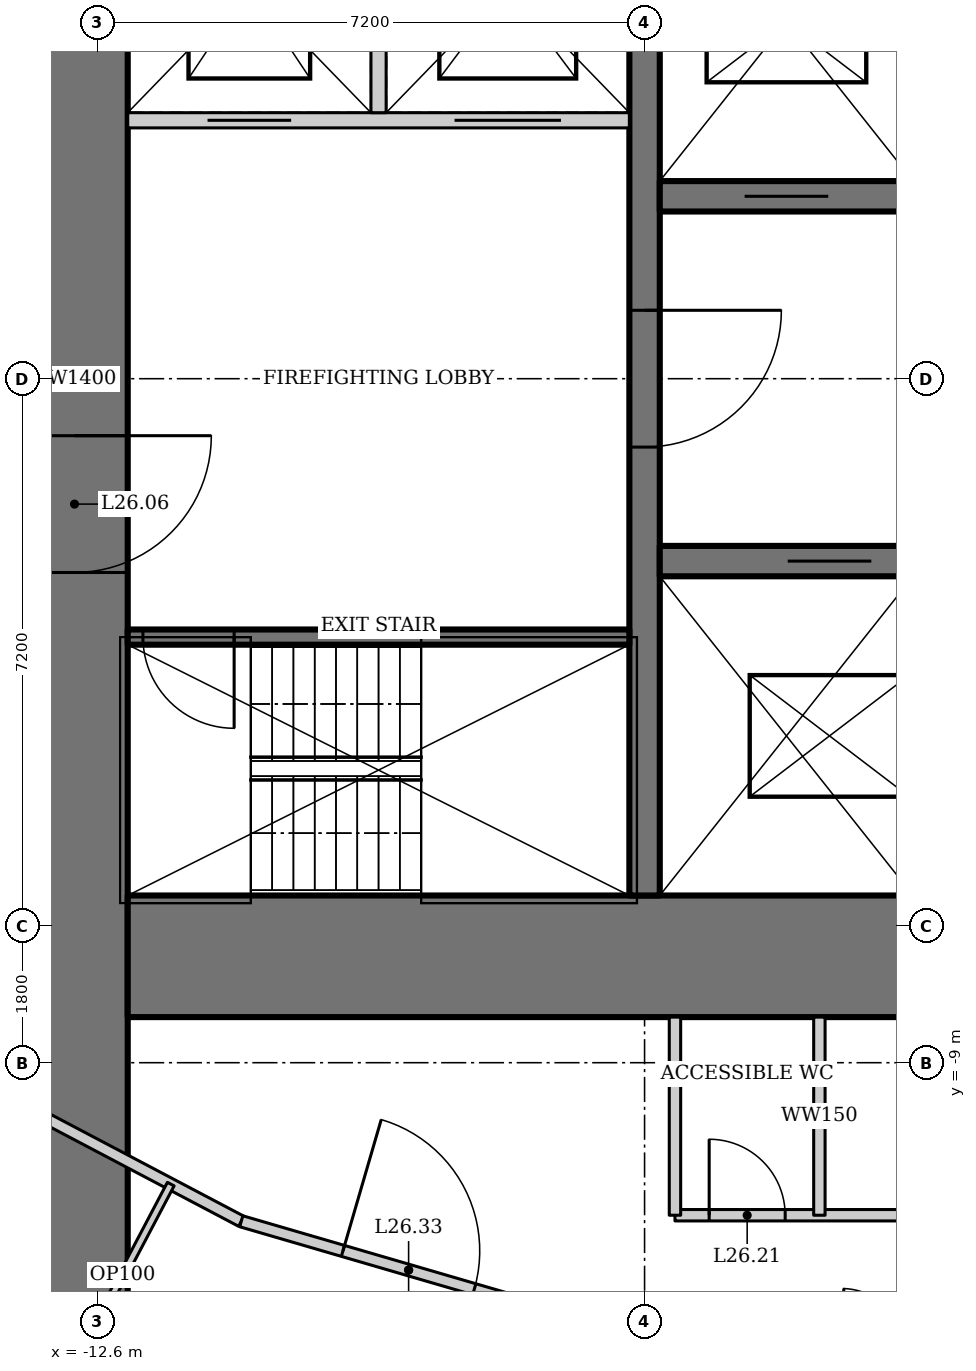
"""IFC4 building model, lengths in metres.
Left out: names, types, materials, properties, quantities, classifications, styles, units other than length and angle.
Written with IfcOpenShell. Run it as: python <this file> out.ifc"""

import sys

from ifc_helpers import new_model, si_unit, direction, frame, frame_2d, origin, place, context, subcontext, project, spatial, rectangle, extrude, element, fill, save


model = new_model("IFC4")
c1 = context("Model", 3, precision=1e-05, world=origin(), true_north=direction((0.0, 1.0)))
c2 = subcontext(c1, "Body", "Model", "MODEL_VIEW")
j1 = project(units=[si_unit("LENGTHUNIT", "METRE"), si_unit("PLANEANGLEUNIT", "RADIAN")], contexts=[c1])
p1 = place(None, origin())
s1 = spatial("IfcSite", under=j1, at=p1, CompositionType="ELEMENT")
p2 = place(p1, origin())
s2 = spatial("IfcBuilding", under=s1, at=p2, CompositionType="ELEMENT")
p3 = place(p2, frame((0.0, 0.0, 111.4)))
s3 = spatial("IfcBuildingStorey", under=s2, at=p3, CompositionType="ELEMENT", Elevation=111.4)
p4 = place(p3, frame((-12.9, 13.0, 0.0), z_axis=(0.0, 0.0, 1.0), x_axis=(0.0, -1.0, 0.0)))
e1 = element("IfcWall", 1, at=p4, inside=s3, PredefinedType="SHEAR", context=c2, shape_type="SweptSolid", body=[
    extrude(rectangle(XDim=26.0, YDim=1.4, at=frame_2d((13.0, 0.0))), origin(), (0.0, 0.0, 1.0), 6.0),
])
p5 = place(p4, frame((13.75, 0.0, 0.0)))
e2 = element("IfcOpeningElement", 2, at=p5, cuts=e1, PredefinedType="OPENING", context=c2, shape_type="SweptSolid", body=[
    extrude(rectangle(XDim=1.8, YDim=2.1, at=frame_2d((0.9, 1.05))), frame((0.0, 0.71, 0.0), z_axis=(0.0, -1.0, 0.0), x_axis=(1.0, 0.0, 0.0)), (0.0, 0.0, 1.0), 1.42),
])
p6 = place(p3, frame((-12.2, -7.6, 0.0), z_axis=(0.0, 0.0, 1.0), x_axis=(1.0, 0.0, 0.0)))
e3 = element("IfcWall", 3, at=p6, inside=s3, PredefinedType="SHEAR", context=c2, shape_type="SweptSolid", body=[
    extrude(rectangle(XDim=24.4, YDim=1.6, at=frame_2d((12.2, 0.0))), origin(), (0.0, 0.0, 1.0), 6.0),
])
p7 = place(p3, frame((-5.4, 6.8, 0.0), z_axis=(0.0, 0.0, 1.0), x_axis=(0.0, -1.0, 0.0)))
e4 = element("IfcWall", 4, at=p7, inside=s3, PredefinedType="SHEAR", context=c2, shape_type="SweptSolid", body=[
    extrude(rectangle(XDim=13.6, YDim=0.4, at=frame_2d((6.8, 0.0))), origin(), (0.0, 0.0, 1.0), 6.0),
])
p8 = place(p7, frame((5.9, 0.0, 0.0)))
e5 = element("IfcOpeningElement", 5, at=p8, cuts=e4, PredefinedType="OPENING", context=c2, shape_type="SweptSolid", body=[
    extrude(rectangle(XDim=1.8, YDim=2.1, at=frame_2d((0.9, 1.05))), frame((0.0, 0.21, 0.0), z_axis=(0.0, -1.0, 0.0), x_axis=(1.0, 0.0, 0.0)), (0.0, 0.0, 1.0), 0.42),
])
p9 = place(p3, frame((-5.2, -2.4, 0.0), z_axis=(0.0, 0.0, 1.0), x_axis=(1.0, 0.0, 0.0)))
e6 = element("IfcWall", 6, at=p9, inside=s3, PredefinedType="SHEAR", context=c2, shape_type="SweptSolid", body=[
    extrude(rectangle(XDim=10.4, YDim=0.4, at=frame_2d((5.2, 0.0))), origin(), (0.0, 0.0, 1.0), 6.0),
])
p10 = place(p9, frame((1.683, 0.0, 0.0)))
e7 = element("IfcOpeningElement", 7, at=p10, cuts=e6, PredefinedType="OPENING", context=c2, shape_type="SweptSolid", body=[
    extrude(rectangle(XDim=1.1, YDim=2.2, at=frame_2d((0.55, 1.1))), frame((0.0, 0.21, 0.0), z_axis=(0.0, -1.0, 0.0), x_axis=(1.0, 0.0, 0.0)), (0.0, 0.0, 1.0), 0.42),
])
p11 = place(p9, frame((5.217, 0.0, 0.0)))
e8 = element("IfcOpeningElement", 8, at=p11, cuts=e6, PredefinedType="OPENING", context=c2, shape_type="SweptSolid", body=[
    extrude(rectangle(XDim=1.1, YDim=2.2, at=frame_2d((0.55, 1.1))), frame((0.0, 0.21, 0.0), z_axis=(0.0, -1.0, 0.0), x_axis=(1.0, 0.0, 0.0)), (0.0, 0.0, 1.0), 0.42),
])
p12 = place(p9, frame((8.75, 0.0, 0.0)))
e9 = element("IfcOpeningElement", 9, at=p12, cuts=e6, PredefinedType="OPENING", context=c2, shape_type="SweptSolid", body=[
    extrude(rectangle(XDim=1.1, YDim=2.2, at=frame_2d((0.55, 1.1))), frame((0.0, 0.21, 0.0), z_axis=(0.0, -1.0, 0.0), x_axis=(1.0, 0.0, 0.0)), (0.0, 0.0, 1.0), 0.42),
])
p13 = place(p3, frame((5.2, 2.4, 0.0), z_axis=(0.0, 0.0, 1.0), x_axis=(-1.0, 0.0, 0.0)))
e10 = element("IfcWall", 10, at=p13, inside=s3, PredefinedType="SHEAR", context=c2, shape_type="SweptSolid", body=[
    extrude(rectangle(XDim=10.4, YDim=0.4, at=frame_2d((5.2, 0.0))), origin(), (0.0, 0.0, 1.0), 6.0),
])
p14 = place(p13, frame((8.183, 0.0, 0.0)))
e11 = element("IfcOpeningElement", 11, at=p14, cuts=e10, PredefinedType="OPENING", context=c2, shape_type="SweptSolid", body=[
    extrude(rectangle(XDim=1.1, YDim=2.2, at=frame_2d((0.55, 1.1))), frame((0.0, 0.21, 0.0), z_axis=(0.0, -1.0, 0.0), x_axis=(1.0, 0.0, 0.0)), (0.0, 0.0, 1.0), 0.42),
])
p15 = place(p13, frame((4.65, 0.0, 0.0)))
e12 = element("IfcOpeningElement", 12, at=p15, cuts=e10, PredefinedType="OPENING", context=c2, shape_type="SweptSolid", body=[
    extrude(rectangle(XDim=1.1, YDim=2.2, at=frame_2d((0.55, 1.1))), frame((0.0, 0.21, 0.0), z_axis=(0.0, -1.0, 0.0), x_axis=(1.0, 0.0, 0.0)), (0.0, 0.0, 1.0), 0.42),
])
p16 = place(p13, frame((1.117, 0.0, 0.0)))
e13 = element("IfcOpeningElement", 13, at=p16, cuts=e10, PredefinedType="OPENING", context=c2, shape_type="SweptSolid", body=[
    extrude(rectangle(XDim=1.1, YDim=2.2, at=frame_2d((0.55, 1.1))), frame((0.0, 0.21, 0.0), z_axis=(0.0, -1.0, 0.0), x_axis=(1.0, 0.0, 0.0)), (0.0, 0.0, 1.0), 0.42),
])
p17 = place(p3, frame((-5.6, -3.4, 0.0), z_axis=(0.0, 0.0, 1.0), x_axis=(-1.0, 0.0, 0.0)))
e14 = element("IfcWall", 14, at=p17, inside=s3, PredefinedType="SHEAR", context=c2, shape_type="SweptSolid", body=[
    extrude(rectangle(XDim=6.6, YDim=0.2, at=frame_2d((3.3, 0.0))), origin(), (0.0, 0.0, 1.0), 6.0),
])
p18 = place(p17, frame((5.2, 0.0, 0.0)))
e15 = element("IfcOpeningElement", 15, at=p18, cuts=e14, PredefinedType="OPENING", context=c2, shape_type="SweptSolid", body=[
    extrude(rectangle(XDim=1.2, YDim=2.1, at=frame_2d((0.6, 1.05))), frame((0.0, 0.11, 0.0), z_axis=(0.0, -1.0, 0.0), x_axis=(1.0, 0.0, 0.0)), (0.0, 0.0, 1.0), 0.22),
])
p19 = place(p3, frame((-12.2, 3.4, 0.0), z_axis=(0.0, 0.0, 1.0), x_axis=(1.0, 0.0, 0.0)))
e16 = element("IfcWall", 16, at=p19, inside=s3, PredefinedType="SOLIDWALL", context=c2, shape_type="SweptSolid", body=[
    extrude(rectangle(XDim=6.6, YDim=0.2, at=frame_2d((3.3, 0.0))), origin(), (0.0, 0.0, 1.0), 6.0),
])
p20 = place(p19, frame((1.05, 0.0, 0.0)))
e17 = element("IfcOpeningElement", 17, at=p20, cuts=e16, PredefinedType="OPENING", context=c2, shape_type="SweptSolid", body=[
    extrude(rectangle(XDim=1.1, YDim=2.2, at=frame_2d((0.55, 1.1))), frame((0.0, 0.11, 0.0), z_axis=(0.0, -1.0, 0.0), x_axis=(1.0, 0.0, 0.0)), (0.0, 0.0, 1.0), 0.22),
])
p21 = place(p19, frame((4.3, 0.0, 0.0)))
e18 = element("IfcOpeningElement", 18, at=p21, cuts=e16, PredefinedType="OPENING", context=c2, shape_type="SweptSolid", body=[
    extrude(rectangle(XDim=1.4, YDim=2.2, at=frame_2d((0.7, 1.1))), frame((0.0, 0.11, 0.0), z_axis=(0.0, -1.0, 0.0), x_axis=(1.0, 0.0, 0.0)), (0.0, 0.0, 1.0), 0.22),
])
p22 = place(p3, frame((-8.9, 3.5, 0.0), z_axis=(0.0, 0.0, 1.0), x_axis=(0.0, 1.0, 0.0)))
e19 = element("IfcWall", 19, at=p22, inside=s3, PredefinedType="SOLIDWALL", context=c2, shape_type="SweptSolid", body=[
    extrude(rectangle(XDim=3.3, YDim=0.2, at=frame_2d((1.65, 0.0))), origin(), (0.0, 0.0, 1.0), 6.0),
])
p23 = place(p3, frame((-15.229, -8.702, 0.0), z_axis=(0.0, 0.0, 1.0), x_axis=(0.884643590306, -0.466267860924, 0.0)))
e20 = element("IfcWall", 20, at=p23, inside=s3, PredefinedType="PARTITIONING", context=c2, shape_type="SweptSolid", body=[
    extrude(rectangle(XDim=5.113, YDim=0.15, at=frame_2d((2.557, 0.0))), origin(), (0.0, 0.0, 1.0), 5.85),
])
p24 = place(p3, frame((-10.706, -11.086, 0.0), z_axis=(0.0, 0.0, 1.0), x_axis=(0.96001728753, -0.279940721659, 0.0)))
e21 = element("IfcWall", 21, at=p24, inside=s3, PredefinedType="PARTITIONING", context=c2, shape_type="SweptSolid", body=[
    extrude(rectangle(XDim=4.586, YDim=0.15, at=frame_2d((2.293, 0.0))), origin(), (0.0, 0.0, 1.0), 5.85),
])
p25 = place(p24, frame((1.393, 0.0, 0.0)))
e22 = element("IfcOpeningElement", 22, at=p25, cuts=e21, PredefinedType="OPENING", context=c2, shape_type="SweptSolid", body=[
    extrude(rectangle(XDim=1.8, YDim=2.1, at=frame_2d((0.9, 1.05))), frame((0.0, 0.085, 0.0), z_axis=(0.0, -1.0, 0.0), x_axis=(1.0, 0.0, 0.0)), (0.0, 0.0, 1.0), 0.17),
])
p26 = place(p3, frame((-5.0, -11.007, 0.0), z_axis=(0.0, 0.0, 1.0), x_axis=(1.0, 0.0, 0.0)))
e23 = element("IfcWall", 23, at=p26, inside=s3, PredefinedType="SOLIDWALL", context=c2, shape_type="SweptSolid", body=[
    extrude(rectangle(XDim=10.0, YDim=0.15, at=frame_2d((5.0, 0.0))), origin(), (0.0, 0.0, 1.0), 5.85),
])
p27 = place(p26, frame((0.45, 0.0, 0.0)))
e24 = element("IfcOpeningElement", 24, at=p27, cuts=e23, PredefinedType="OPENING", context=c2, shape_type="SweptSolid", body=[
    extrude(rectangle(XDim=1.0, YDim=2.1, at=frame_2d((0.5, 1.05))), frame((0.0, 0.085, 0.0), z_axis=(0.0, -1.0, 0.0), x_axis=(1.0, 0.0, 0.0)), (0.0, 0.0, 1.0), 0.17),
])
p28 = place(p26, frame((3.15, 0.0, 0.0)))
e25 = element("IfcOpeningElement", 25, at=p28, cuts=e23, PredefinedType="OPENING", context=c2, shape_type="SweptSolid", body=[
    extrude(rectangle(XDim=0.9, YDim=2.1, at=frame_2d((0.45, 1.05))), frame((0.0, 0.085, 0.0), z_axis=(0.0, -1.0, 0.0), x_axis=(1.0, 0.0, 0.0)), (0.0, 0.0, 1.0), 0.17),
])
p29 = place(p26, frame((6.55, 0.0, 0.0)))
e26 = element("IfcOpeningElement", 26, at=p29, cuts=e23, PredefinedType="OPENING", context=c2, shape_type="SweptSolid", body=[
    extrude(rectangle(XDim=0.9, YDim=2.1, at=frame_2d((0.45, 1.05))), frame((0.0, 0.085, 0.0), z_axis=(0.0, -1.0, 0.0), x_axis=(1.0, 0.0, 0.0)), (0.0, 0.0, 1.0), 0.17),
])
p30 = place(p26, frame((8.95, 0.0, 0.0)))
e27 = element("IfcOpeningElement", 27, at=p30, cuts=e23, PredefinedType="OPENING", context=c2, shape_type="SweptSolid", body=[
    extrude(rectangle(XDim=0.8, YDim=2.1, at=frame_2d((0.4, 1.05))), frame((0.0, 0.085, 0.0), z_axis=(0.0, -1.0, 0.0), x_axis=(1.0, 0.0, 0.0)), (0.0, 0.0, 1.0), 0.17),
])
for number, where, z_axis, x_axis in (
    (28, (-5.0, -8.4, 0.0), (0.0, 0.0, 1.0), (0.0, -1.0, 0.0)),
    (29, (-3.1, -8.4, 0.0), (0.0, 0.0, 1.0), (0.0, -1.0, 0.0)),
):
    element("IfcWall", number, at=place(p3, frame(where, z_axis=z_axis, x_axis=x_axis)), inside=s3, PredefinedType="SOLIDWALL", context=c2, shape_type="SweptSolid", body=[
        extrude(rectangle(XDim=2.607, YDim=0.15, at=frame_2d((1.304, 0.0))), origin(), (0.0, 0.0, 1.0), 5.85),
    ])
p31 = place(p3, frame((-12.9, -13.0, 0.0), z_axis=(0.0, 0.0, 1.0), x_axis=(0.466205800243, 0.884676297761, 0.0)))
e30 = element("IfcWall", 30, at=p31, inside=s3, PredefinedType="PARTITIONING", context=c2, shape_type="SweptSolid", body=[
    extrude(rectangle(XDim=2.716, YDim=0.1, at=frame_2d((1.358, 0.0))), origin(), (0.0, 0.0, 1.0), 5.85),
])
p32 = place(p8, origin())
e31 = element("IfcDoor", 31, at=p32, inside=s3, OperationType="DOUBLE_DOOR_DOUBLE_SWING", PredefinedType="DOOR", context=c2, shape_type="SweptSolid", body=[
    extrude(rectangle(XDim=1.8, YDim=2.1, at=frame_2d((0.9, 1.05))), frame((0.0, 0.025, 0.0), z_axis=(0.0, -1.0, 0.0), x_axis=(1.0, 0.0, 0.0)), (0.0, 0.0, 1.0), 0.05),
])
fill(e5, e31)
p33 = place(p18, origin())
e32 = element("IfcDoor", 32, at=p33, inside=s3, OperationType="SINGLE_SWING_RIGHT", PredefinedType="DOOR", context=c2, shape_type="SweptSolid", body=[
    extrude(rectangle(XDim=1.2, YDim=2.1, at=frame_2d((0.6, 1.05))), frame((0.0, 0.025, 0.0), z_axis=(0.0, -1.0, 0.0), x_axis=(1.0, 0.0, 0.0)), (0.0, 0.0, 1.0), 0.05),
])
fill(e15, e32)
p34 = place(p5, origin())
e33 = element("IfcDoor", 33, at=p34, inside=s3, OperationType="DOUBLE_DOOR_DOUBLE_SWING", PredefinedType="DOOR", context=c2, shape_type="SweptSolid", body=[
    extrude(rectangle(XDim=1.8, YDim=2.1, at=frame_2d((0.9, 1.05))), frame((0.0, 0.025, 0.0), z_axis=(0.0, -1.0, 0.0), x_axis=(1.0, 0.0, 0.0)), (0.0, 0.0, 1.0), 0.05),
])
fill(e2, e33)
p35 = place(p14, origin())
e34 = element("IfcDoor", 34, at=p35, inside=s3, OperationType="DOUBLE_DOOR_SLIDING", PredefinedType="DOOR", context=c2, shape_type="SweptSolid", body=[
    extrude(rectangle(XDim=1.1, YDim=2.2, at=frame_2d((0.55, 1.1))), frame((0.0, 0.025, 0.0), z_axis=(0.0, -1.0, 0.0), x_axis=(1.0, 0.0, 0.0)), (0.0, 0.0, 1.0), 0.05),
])
fill(e11, e34)
p36 = place(p10, origin())
e35 = element("IfcDoor", 35, at=p36, inside=s3, OperationType="DOUBLE_DOOR_SLIDING", PredefinedType="DOOR", context=c2, shape_type="SweptSolid", body=[
    extrude(rectangle(XDim=1.1, YDim=2.2, at=frame_2d((0.55, 1.1))), frame((0.0, 0.025, 0.0), z_axis=(0.0, -1.0, 0.0), x_axis=(1.0, 0.0, 0.0)), (0.0, 0.0, 1.0), 0.05),
])
fill(e7, e35)
p37 = place(p20, origin())
e36 = element("IfcDoor", 36, at=p37, inside=s3, OperationType="DOUBLE_DOOR_SLIDING", PredefinedType="DOOR", context=c2, shape_type="SweptSolid", body=[
    extrude(rectangle(XDim=1.1, YDim=2.2, at=frame_2d((0.55, 1.1))), frame((0.0, 0.025, 0.0), z_axis=(0.0, -1.0, 0.0), x_axis=(1.0, 0.0, 0.0)), (0.0, 0.0, 1.0), 0.05),
])
fill(e17, e36)
p38 = place(p21, origin())
e37 = element("IfcDoor", 37, at=p38, inside=s3, OperationType="DOUBLE_DOOR_SLIDING", PredefinedType="DOOR", context=c2, shape_type="SweptSolid", body=[
    extrude(rectangle(XDim=1.4, YDim=2.2, at=frame_2d((0.7, 1.1))), frame((0.0, 0.025, 0.0), z_axis=(0.0, -1.0, 0.0), x_axis=(1.0, 0.0, 0.0)), (0.0, 0.0, 1.0), 0.05),
])
fill(e18, e37)
p39 = place(p27, origin())
e38 = element("IfcDoor", 38, at=p39, inside=s3, OperationType="SINGLE_SWING_LEFT", PredefinedType="DOOR", context=c2, shape_type="SweptSolid", body=[
    extrude(rectangle(XDim=1.0, YDim=2.1, at=frame_2d((0.5, 1.05))), frame((0.0, 0.025, 0.0), z_axis=(0.0, -1.0, 0.0), x_axis=(1.0, 0.0, 0.0)), (0.0, 0.0, 1.0), 0.05),
])
fill(e24, e38)
p40 = place(p25, origin())
e39 = element("IfcDoor", 39, at=p40, inside=s3, OperationType="DOUBLE_DOOR_DOUBLE_SWING", PredefinedType="DOOR", context=c2, shape_type="SweptSolid", body=[
    extrude(rectangle(XDim=1.8, YDim=2.1, at=frame_2d((0.9, 1.05))), frame((0.0, 0.025, 0.0), z_axis=(0.0, -1.0, 0.0), x_axis=(1.0, 0.0, 0.0)), (0.0, 0.0, 1.0), 0.05),
])
fill(e22, e39)
save(model, sys.argv[1])
